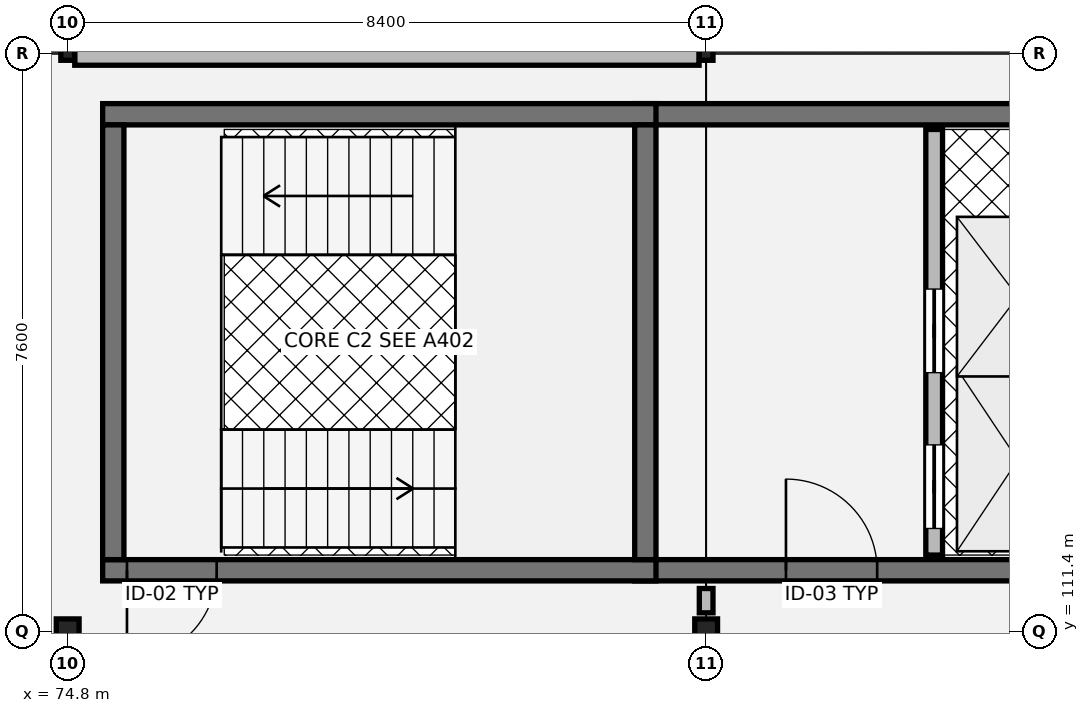
"""IFC4 building model, lengths in metres.
Left out: names, types, materials, properties, quantities, classifications, styles, units other than length and angle.
Written with IfcOpenShell. Run it as: python <this file> out.ifc"""

import sys

from ifc_helpers import new_model, si_unit, direction, frame, frame_2d, origin, origin_2d, place, context, subcontext, project, spatial, rectangle, hollow_rectangle, i_section, extrude, element, fill, save


model = new_model("IFC4")
c1 = context("Model", 3, precision=1e-05, world=origin(), true_north=direction((0.0, 1.0)))
c2 = subcontext(c1, "Body", "Model", "MODEL_VIEW")
j1 = project(units=[si_unit("LENGTHUNIT", "METRE"), si_unit("PLANEANGLEUNIT", "RADIAN")], contexts=[c1])
p1 = place(None, origin())
s1 = spatial("IfcSite", under=j1, at=p1, CompositionType="ELEMENT")
p2 = place(p1, origin())
s2 = spatial("IfcBuilding", under=s1, at=p2, CompositionType="ELEMENT")
p3 = place(p2, frame((0.0, 0.0, 17.34)))
s3 = spatial("IfcBuildingStorey", under=s2, at=p3, CompositionType="ELEMENT", Elevation=17.34)
p4 = place(p3, frame((74.8, 111.4, 0.0), z_axis=(0.0, 0.0, 1.0), x_axis=(1.0, 0.0, 0.0)))
e1 = element("IfcColumn", 1, at=p4, inside=s3, PredefinedType="COLUMN", context=c2, shape_type="SweptSolid", body=[
    extrude(i_section(OverallWidth=0.3, OverallDepth=0.32, WebThickness=0.011, FlangeThickness=0.021, at=origin_2d()), origin(), (0.0, 0.0, 1.0), 4.055),
])
p5 = place(p3, frame((74.8, 119.0, 0.0), z_axis=(0.0, 0.0, 1.0), x_axis=(1.0, 0.0, 0.0)))
e2 = element("IfcColumn", 2, at=p5, inside=s3, PredefinedType="COLUMN", context=c2, shape_type="SweptSolid", body=[
    extrude(hollow_rectangle(XDim=0.18, YDim=0.18, WallThickness=0.01, at=origin_2d()), origin(), (0.0, 0.0, 1.0), 4.055),
])
p6 = place(p3, frame((83.2, 111.4, 0.0), z_axis=(0.0, 0.0, 1.0), x_axis=(1.0, 0.0, 0.0)))
e3 = element("IfcColumn", 3, at=p6, inside=s3, PredefinedType="COLUMN", context=c2, shape_type="SweptSolid", body=[
    extrude(i_section(OverallWidth=0.3, OverallDepth=0.32, WebThickness=0.011, FlangeThickness=0.021, at=origin_2d()), origin(), (0.0, 0.0, 1.0), 4.055),
])
p7 = place(p3, frame((83.2, 119.0, 0.0), z_axis=(0.0, 0.0, 1.0), x_axis=(1.0, 0.0, 0.0)))
e4 = element("IfcColumn", 4, at=p7, inside=s3, PredefinedType="COLUMN", context=c2, shape_type="SweptSolid", body=[
    extrude(hollow_rectangle(XDim=0.18, YDim=0.18, WallThickness=0.01, at=origin_2d()), origin(), (0.0, 0.0, 1.0), 4.055),
])
p8 = place(p3, frame((83.107, 119.0, 0.0), z_axis=(0.0, 0.0, 1.0), x_axis=(-1.0, 0.0, 0.0)))
e5 = element("IfcWall", 5, at=p8, inside=s3, PredefinedType="SOLIDWALL", context=c2, shape_type="SweptSolid", body=[
    extrude(rectangle(XDim=8.214, YDim=0.31, at=frame_2d((4.107, 0.0))), origin(), (0.0, 0.0, 1.0), 3.48),
])
p9 = place(p3, frame((82.26, 112.2, 0.0), z_axis=(0.0, 0.0, 1.0), x_axis=(1.0, 0.0, 0.0)))
e6 = element("IfcWall", 6, at=p9, inside=s3, PredefinedType="SHEAR", context=c2, shape_type="SweptSolid", body=[
    extrude(rectangle(XDim=6.33, YDim=0.28, at=frame_2d((3.165, 0.0))), origin(), (0.0, 0.0, 1.0), 3.845),
])
p10 = place(p9, frame((1.99, 0.0, 0.0)))
e7 = element("IfcOpeningElement", 7, at=p10, cuts=e6, PredefinedType="OPENING", context=c2, shape_type="SweptSolid", body=[
    extrude(rectangle(XDim=1.2, YDim=2.16, at=frame_2d((0.6, 1.08))), frame((0.0, 0.15, 0.0), z_axis=(0.0, -1.0, 0.0), x_axis=(1.0, 0.0, 0.0)), (0.0, 0.0, 1.0), 0.3),
])
p11 = place(p3, frame((88.59, 118.2, 0.0), z_axis=(0.0, 0.0, 1.0), x_axis=(-1.0, 0.0, 0.0)))
e8 = element("IfcWall", 8, at=p11, inside=s3, PredefinedType="SHEAR", context=c2, shape_type="SweptSolid", body=[
    extrude(rectangle(XDim=6.33, YDim=0.28, at=frame_2d((3.165, 0.0))), origin(), (0.0, 0.0, 1.0), 3.845),
])
p12 = place(p3, frame((86.2, 112.4, 0.0), z_axis=(0.0, 0.0, 1.0), x_axis=(0.0, 1.0, 0.0)))
e9 = element("IfcWall", 9, at=p12, inside=s3, PredefinedType="SOLIDWALL", context=c2, shape_type="SweptSolid", body=[
    extrude(rectangle(XDim=5.6, YDim=0.22, at=frame_2d((2.8, 0.0))), origin(), (0.0, 0.0, 1.0), 3.845),
])
p13 = place(p12, frame((0.35, 0.0, 0.0)))
e10 = element("IfcOpeningElement", 10, at=p13, cuts=e9, PredefinedType="OPENING", context=c2, shape_type="SweptSolid", body=[
    extrude(rectangle(XDim=1.1, YDim=2.15, at=frame_2d((0.55, 1.075))), frame((0.0, 0.12, 0.0), z_axis=(0.0, -1.0, 0.0), x_axis=(1.0, 0.0, 0.0)), (0.0, 0.0, 1.0), 0.24),
])
p14 = place(p12, frame((2.4, 0.0, 0.0)))
e11 = element("IfcOpeningElement", 11, at=p14, cuts=e9, PredefinedType="OPENING", context=c2, shape_type="SweptSolid", body=[
    extrude(rectangle(XDim=1.1, YDim=2.15, at=frame_2d((0.55, 1.075))), frame((0.0, 0.12, 0.0), z_axis=(0.0, -1.0, 0.0), x_axis=(1.0, 0.0, 0.0)), (0.0, 0.0, 1.0), 0.24),
])
p15 = place(p3, frame((75.26, 112.2, 0.0), z_axis=(0.0, 0.0, 1.0), x_axis=(1.0, 0.0, 0.0)))
e12 = element("IfcWall", 12, at=p15, inside=s3, PredefinedType="SHEAR", context=c2, shape_type="SweptSolid", body=[
    extrude(rectangle(XDim=7.28, YDim=0.28, at=frame_2d((3.64, 0.0))), origin(), (0.0, 0.0, 1.0), 3.845),
])
p16 = place(p15, frame((0.32, 0.0, 0.0)))
e13 = element("IfcOpeningElement", 13, at=p16, cuts=e12, PredefinedType="OPENING", context=c2, shape_type="SweptSolid", body=[
    extrude(rectangle(XDim=1.18, YDim=2.18, at=frame_2d((0.59, 1.09))), frame((0.0, 0.15, 0.0), z_axis=(0.0, -1.0, 0.0), x_axis=(1.0, 0.0, 0.0)), (0.0, 0.0, 1.0), 0.3),
])
p17 = place(p3, frame((75.26, 118.2, 0.0), z_axis=(0.0, 0.0, 1.0), x_axis=(1.0, 0.0, 0.0)))
e14 = element("IfcWall", 14, at=p17, inside=s3, PredefinedType="SHEAR", context=c2, shape_type="SweptSolid", body=[
    extrude(rectangle(XDim=7.28, YDim=0.28, at=frame_2d((3.64, 0.0))), origin(), (0.0, 0.0, 1.0), 3.845),
])
for number, where, z_axis, x_axis in (
    (15, (75.4, 112.34, 0.0), (0.0, 0.0, 1.0), (0.0, 1.0, 0.0)),
    (16, (82.4, 112.34, 0.0), (0.0, 0.0, 1.0), (0.0, 1.0, 0.0)),
):
    element("IfcWall", number, at=place(p3, frame(where, z_axis=z_axis, x_axis=x_axis)), inside=s3, PredefinedType="SHEAR", context=c2, shape_type="SweptSolid", body=[
        extrude(rectangle(XDim=5.72, YDim=0.28, at=frame_2d((2.86, 0.0))), origin(), (0.0, 0.0, 1.0), 3.845),
    ])
p18 = place(p3, frame((83.2, 111.64, 0.0), z_axis=(0.0, 0.0, 1.0), x_axis=(0.0, 1.0, 0.0)))
e17 = element("IfcWall", 17, at=p18, inside=s3, PredefinedType="PARTITIONING", context=c2, shape_type="SweptSolid", body=[
    extrude(rectangle(XDim=0.32, YDim=0.18, at=frame_2d((0.16, 0.0))), origin(), (0.0, 0.0, 1.0), 3.18),
])
p19 = place(p10, origin())
e18 = element("IfcDoor", 18, at=p19, inside=s3, OperationType="SINGLE_SWING_LEFT", PredefinedType="DOOR", context=c2, shape_type="SweptSolid", body=[
    extrude(rectangle(XDim=1.2, YDim=2.16, at=frame_2d((0.6, 1.08))), frame((0.0, 0.025, 0.0), z_axis=(0.0, -1.0, 0.0), x_axis=(1.0, 0.0, 0.0)), (0.0, 0.0, 1.0), 0.05),
])
fill(e7, e18)
p20 = place(p13, origin())
e19 = element("IfcDoor", 19, at=p20, inside=s3, OperationType="SLIDING_TO_LEFT", PredefinedType="DOOR", context=c2, shape_type="SweptSolid", body=[
    extrude(rectangle(XDim=1.1, YDim=2.15, at=frame_2d((0.55, 1.075))), frame((0.0, 0.025, 0.0), z_axis=(0.0, -1.0, 0.0), x_axis=(1.0, 0.0, 0.0)), (0.0, 0.0, 1.0), 0.05),
])
fill(e10, e19)
p21 = place(p14, origin())
e20 = element("IfcDoor", 20, at=p21, inside=s3, OperationType="SLIDING_TO_LEFT", PredefinedType="DOOR", context=c2, shape_type="SweptSolid", body=[
    extrude(rectangle(XDim=1.1, YDim=2.15, at=frame_2d((0.55, 1.075))), frame((0.0, 0.025, 0.0), z_axis=(0.0, -1.0, 0.0), x_axis=(1.0, 0.0, 0.0)), (0.0, 0.0, 1.0), 0.05),
])
fill(e11, e20)
p22 = place(p16, origin())
e21 = element("IfcDoor", 21, at=p22, inside=s3, OperationType="SINGLE_SWING_RIGHT", PredefinedType="DOOR", context=c2, shape_type="SweptSolid", body=[
    extrude(rectangle(XDim=1.18, YDim=2.18, at=frame_2d((0.59, 1.09))), frame((0.0, 0.025, 0.0), z_axis=(0.0, -1.0, 0.0), x_axis=(1.0, 0.0, 0.0)), (0.0, 0.0, 1.0), 0.05),
])
fill(e13, e21)
save(model, sys.argv[1])
